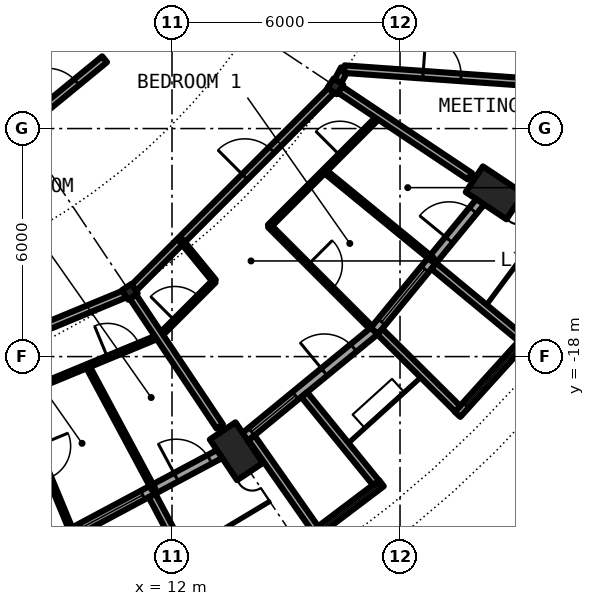
"""IFC4 building model, lengths in metres.
Left out: names, types, materials, properties, quantities, classifications, styles, units other than length and angle.
Written with IfcOpenShell. Run it as: python <this file> out.ifc"""

import sys

from ifc_helpers import new_model, si_unit, direction, frame, frame_2d, origin, origin_2d, place, context, subcontext, project, spatial, rectangle, circle, hollow_circle, i_section, extrude, element, fill, save


model = new_model("IFC4")
c1 = context("Model", 3, precision=1e-05, world=origin(), true_north=direction((0.0, 1.0)))
c2 = subcontext(c1, "Body", "Model", "MODEL_VIEW")
j1 = project(units=[si_unit("LENGTHUNIT", "METRE"), si_unit("PLANEANGLEUNIT", "RADIAN")], contexts=[c1])
p1 = place(None, origin())
s1 = spatial("IfcSite", under=j1, at=p1, CompositionType="ELEMENT")
p2 = place(p1, origin())
s2 = spatial("IfcBuilding", under=s1, at=p2, CompositionType="ELEMENT")
p3 = place(p2, frame((0.0, 0.0, 243.2)))
s3 = spatial("IfcBuildingStorey", under=s2, at=p3, CompositionType="ELEMENT", Elevation=243.2)
for number, where, z_axis, x_axis in (
    (1, (14.05, -21.027, 0.242), (-0.232, 0.347, 0.909), (-0.831, -0.556, 0.0)),
    (2, (21.027, -14.05, 0.242), (-0.347, 0.232, 0.909), (-0.556, -0.831, 0.0)),
):
    element("IfcColumn", number, at=place(p3, frame(where, z_axis=z_axis, x_axis=x_axis)), inside=s3, PredefinedType="COLUMN", context=c2, shape_type="SweptSolid", body=[
        extrude(hollow_circle(Radius=0.406, WallThickness=0.03, at=origin_2d()), origin(), (0.0, 0.0, 1.0), 3.09),
    ])
for number, where, z_axis, x_axis in (
    (3, (10.889, -16.297, 0.0), (0.0, 0.0, 1.0), (0.556, -0.831, 0.0)),
    (4, (16.297, -10.889, 0.0), (0.0, 0.0, 1.0), (0.831, -0.556, 0.0)),
):
    element("IfcColumn", number, at=place(p3, frame(where, z_axis=z_axis, x_axis=x_axis)), inside=s3, PredefinedType="COLUMN", context=c2, shape_type="SweptSolid", body=[
        extrude(i_section(OverallWidth=0.3, OverallDepth=0.3, WebThickness=0.011, FlangeThickness=0.019, FilletRadius=0.027, at=origin_2d()), origin(), (0.0, 0.0, 1.0), 3.05),
    ])
p4 = place(p3, frame((9.376, -22.635, 0.0), z_axis=(0.0, 0.0, 1.0), x_axis=(0.881903608701, 0.471429766731, 0.0)))
e5 = element("IfcWall", 5, at=p4, inside=s3, PredefinedType="SOLIDWALL", context=c2, shape_type="SweptSolid", body=[
    extrude(rectangle(XDim=4.802, YDim=0.25, at=frame_2d((2.401, 0.0))), origin(), (0.0, 0.0, 1.0), 2.7),
])
p5 = place(p4, frame((0.304, 0.0, 0.3)))
e6 = element("IfcOpeningElement", 6, at=p5, cuts=e5, PredefinedType="OPENING", context=c2, shape_type="SweptSolid", body=[
    extrude(rectangle(XDim=1.8, YDim=2.1, at=frame_2d((0.9, 1.05))), frame((0.0, 0.135, 0.0), z_axis=(0.0, -1.0, 0.0), x_axis=(1.0, 0.0, 0.0)), (0.0, 0.0, 1.0), 0.27),
])
p6 = place(p4, frame((3.099, 0.0, 0.0)))
e7 = element("IfcOpeningElement", 7, at=p6, cuts=e5, PredefinedType="OPENING", context=c2, shape_type="SweptSolid", body=[
    extrude(rectangle(XDim=1.0, YDim=2.2, at=frame_2d((0.5, 1.1))), frame((0.0, 0.135, 0.0), z_axis=(0.0, -1.0, 0.0), x_axis=(1.0, 0.0, 0.0)), (0.0, 0.0, 1.0), 0.27),
])
p7 = place(p3, frame((11.475, -21.655, -0.03), z_axis=(0.0, 0.0, 1.0), x_axis=(0.467917715158, -0.883772036128, 0.0)))
e8 = element("IfcWall", 8, at=p7, inside=s3, PredefinedType="SOLIDWALL", context=c2, shape_type="SweptSolid", body=[
    extrude(rectangle(XDim=2.992, YDim=0.2, at=frame_2d((1.496, 0.0))), origin(), (0.0, 0.0, 1.0), 2.73),
])
p8 = place(p3, frame((13.611, -20.371, 0.0), z_axis=(0.0, 0.0, 1.0), x_axis=(0.773007538262, 0.634396836208, 0.0)))
e9 = element("IfcWall", 9, at=p8, inside=s3, PredefinedType="SOLIDWALL", context=c2, shape_type="SweptSolid", body=[
    extrude(rectangle(XDim=4.803, YDim=0.25, at=frame_2d((2.402, 0.0))), origin(), (0.0, 0.0, 1.0), 2.7),
])
p9 = place(p8, frame((0.62, 0.0, 0.3)))
e10 = element("IfcOpeningElement", 10, at=p9, cuts=e9, PredefinedType="OPENING", context=c2, shape_type="SweptSolid", body=[
    extrude(rectangle(XDim=1.5, YDim=2.1, at=frame_2d((0.75, 1.05))), frame((0.0, 0.135, 0.0), z_axis=(0.0, -1.0, 0.0), x_axis=(1.0, 0.0, 0.0)), (0.0, 0.0, 1.0), 0.27),
])
p10 = place(p8, frame((3.099, 0.0, 0.0)))
e11 = element("IfcOpeningElement", 11, at=p10, cuts=e9, PredefinedType="OPENING", context=c2, shape_type="SweptSolid", body=[
    extrude(rectangle(XDim=1.0, YDim=2.2, at=frame_2d((0.5, 1.1))), frame((0.0, 0.135, 0.0), z_axis=(0.0, -1.0, 0.0), x_axis=(1.0, 0.0, 0.0)), (0.0, 0.0, 1.0), 0.27),
])
p11 = place(p3, frame((15.74, -22.672, -0.03), z_axis=(0.0, 0.0, 1.0), x_axis=(0.797805050803, 0.602915500641, 0.0)))
e12 = element("IfcWall", 12, at=p11, inside=s3, PredefinedType="SOLIDWALL", context=c2, shape_type="SweptSolid", body=[
    extrude(rectangle(XDim=2.221, YDim=0.2, at=frame_2d((1.11, 0.0))), origin(), (0.0, 0.0, 1.0), 2.73),
])
p12 = place(p11, frame((0.071, 0.0, 0.33)))
e13 = element("IfcOpeningElement", 13, at=p12, cuts=e12, PredefinedType="OPENING", context=c2, shape_type="SweptSolid", body=[
    extrude(circle(Radius=1.04, at=frame_2d((1.04, 1.04))), frame((0.0, 0.11, 0.0), z_axis=(0.0, -1.0, 0.0), x_axis=(1.0, 0.0, 0.0)), (0.0, 0.0, 1.0), 0.22),
])
p13 = place(p3, frame((14.093, -20.138, -0.03), z_axis=(0.0, 0.0, 1.0), x_axis=(0.573596998419, -0.81913764619, 0.0)))
e14 = element("IfcWall", 14, at=p13, inside=s3, PredefinedType="SOLIDWALL", context=c2, shape_type="SweptSolid", body=[
    extrude(rectangle(XDim=2.92, YDim=0.2, at=frame_2d((1.46, 0.0))), origin(), (0.0, 0.0, 1.0), 2.73),
])
p14 = place(p3, frame((15.479, -19.0, -0.03), z_axis=(0.0, 0.0, 1.0), x_axis=(0.631209771017, -0.775612161439, 0.0)))
e15 = element("IfcWall", 15, at=p14, inside=s3, PredefinedType="SOLIDWALL", context=c2, shape_type="SweptSolid", body=[
    extrude(rectangle(XDim=2.992, YDim=0.2, at=frame_2d((1.496, 0.0))), origin(), (0.0, 0.0, 1.0), 2.73),
])
p15 = place(p3, frame((17.324, -17.324, 0.0), z_axis=(0.0, 0.0, 1.0), x_axis=(0.634396836208, 0.773007538262, 0.0)))
e16 = element("IfcWall", 16, at=p15, inside=s3, PredefinedType="SOLIDWALL", context=c2, shape_type="SweptSolid", body=[
    extrude(rectangle(XDim=4.803, YDim=0.25, at=frame_2d((2.402, 0.0))), origin(), (0.0, 0.0, 1.0), 2.7),
])
p16 = place(p15, frame((0.304, 0.0, 0.3)))
e17 = element("IfcOpeningElement", 17, at=p16, cuts=e16, PredefinedType="OPENING", context=c2, shape_type="SweptSolid", body=[
    extrude(rectangle(XDim=1.8, YDim=2.1, at=frame_2d((0.9, 1.05))), frame((0.0, 0.135, 0.0), z_axis=(0.0, -1.0, 0.0), x_axis=(1.0, 0.0, 0.0)), (0.0, 0.0, 1.0), 0.27),
])
p17 = place(p15, frame((3.099, 0.0, 0.0)))
e18 = element("IfcOpeningElement", 18, at=p17, cuts=e16, PredefinedType="OPENING", context=c2, shape_type="SweptSolid", body=[
    extrude(rectangle(XDim=1.0, YDim=2.2, at=frame_2d((0.5, 1.1))), frame((0.0, 0.135, 0.0), z_axis=(0.0, -1.0, 0.0), x_axis=(1.0, 0.0, 0.0)), (0.0, 0.0, 1.0), 0.27),
])
p18 = place(p3, frame((19.513, -19.52, -0.03), z_axis=(0.0, 0.0, 1.0), x_axis=(0.671487056022, 0.741016284298, 0.0)))
e19 = element("IfcWall", 19, at=p18, inside=s3, PredefinedType="SOLIDWALL", context=c2, shape_type="SweptSolid", body=[
    extrude(rectangle(XDim=2.718, YDim=0.2, at=frame_2d((1.359, 0.0))), origin(), (0.0, 0.0, 1.0), 2.73),
])
p19 = place(p18, frame((0.319, 0.0, 0.33)))
e20 = element("IfcOpeningElement", 20, at=p19, cuts=e19, PredefinedType="OPENING", context=c2, shape_type="SweptSolid", body=[
    extrude(circle(Radius=1.04, at=frame_2d((1.04, 1.04))), frame((0.0, 0.11, 0.0), z_axis=(0.0, -1.0, 0.0), x_axis=(1.0, 0.0, 0.0)), (0.0, 0.0, 1.0), 0.22),
])
p20 = place(p3, frame((17.47, -17.344, -0.03), z_axis=(0.0, 0.0, 1.0), x_axis=(0.709896457854, -0.704306055012, 0.0)))
e21 = element("IfcWall", 21, at=p20, inside=s3, PredefinedType="SOLIDWALL", context=c2, shape_type="SweptSolid", body=[
    extrude(rectangle(XDim=2.882, YDim=0.2, at=frame_2d((1.441, 0.0))), origin(), (0.0, 0.0, 1.0), 2.73),
])
p21 = place(p3, frame((18.888, -15.615, -0.03), z_axis=(0.0, 0.0, 1.0), x_axis=(0.770489638069, -0.637452521862, 0.0)))
e22 = element("IfcWall", 22, at=p21, inside=s3, PredefinedType="SOLIDWALL", context=c2, shape_type="SweptSolid", body=[
    extrude(rectangle(XDim=2.993, YDim=0.2, at=frame_2d((1.497, 0.0))), origin(), (0.0, 0.0, 1.0), 2.73),
])
p22 = place(p3, frame((7.874, -19.033, 0.0), z_axis=(0.0, 0.0, 1.0), x_axis=(0.924018283069, 0.382348286976, 0.0)))
e23 = element("IfcWall", 23, at=p22, inside=s3, PredefinedType="PARTITIONING", context=c2, shape_type="SweptSolid", body=[
    extrude(rectangle(XDim=4.101, YDim=0.1, at=frame_2d((2.05, 0.0))), origin(), (0.0, 0.0, 1.0), 2.7),
])
p23 = place(p22, frame((2.632, 0.0, 0.0)))
e24 = element("IfcOpeningElement", 24, at=p23, cuts=e23, PredefinedType="OPENING", context=c2, shape_type="SweptSolid", body=[
    extrude(rectangle(XDim=0.9, YDim=2.3, at=frame_2d((0.45, 1.15))), frame((0.0, 0.06, 0.0), z_axis=(0.0, -1.0, 0.0), x_axis=(1.0, 0.0, 0.0)), (0.0, 0.0, 1.0), 0.12),
])
p24 = place(p3, frame((11.662, -17.466, 0.0), z_axis=(0.0, 0.0, 1.0), x_axis=(0.707106781187, 0.707106781187, 0.0)))
e25 = element("IfcWall", 25, at=p24, inside=s3, PredefinedType="PARTITIONING", context=c2, shape_type="SweptSolid", body=[
    extrude(rectangle(XDim=2.048, YDim=0.1, at=frame_2d((1.024, 0.0))), origin(), (0.0, 0.0, 1.0), 2.7),
])
p25 = place(p24, frame((0.581, 0.0, 0.0)))
e26 = element("IfcOpeningElement", 26, at=p25, cuts=e25, PredefinedType="OPENING", context=c2, shape_type="SweptSolid", body=[
    extrude(rectangle(XDim=0.9, YDim=2.3, at=frame_2d((0.45, 1.15))), frame((0.0, 0.06, 0.0), z_axis=(0.0, -1.0, 0.0), x_axis=(1.0, 0.0, 0.0)), (0.0, 0.0, 1.0), 0.12),
])
p26 = place(p3, frame((14.559, -14.569, 0.0), z_axis=(0.0, 0.0, 1.0), x_axis=(0.707106781187, 0.707106781187, 0.0)))
e27 = element("IfcWall", 27, at=p26, inside=s3, PredefinedType="PARTITIONING", context=c2, shape_type="SweptSolid", body=[
    extrude(rectangle(XDim=4.111, YDim=0.1, at=frame_2d((2.056, 0.0))), origin(), (0.0, 0.0, 1.0), 2.7),
])
p27 = place(p26, frame((2.633, 0.0, 0.0)))
e28 = element("IfcOpeningElement", 28, at=p27, cuts=e27, PredefinedType="OPENING", context=c2, shape_type="SweptSolid", body=[
    extrude(rectangle(XDim=0.9, YDim=2.3, at=frame_2d((0.45, 1.15))), frame((0.0, 0.06, 0.0), z_axis=(0.0, -1.0, 0.0), x_axis=(1.0, 0.0, 0.0)), (0.0, 0.0, 1.0), 0.12),
])
p28 = place(p3, frame((16.367, -10.756, 0.0), z_axis=(0.0, 0.0, 1.0), x_axis=(0.465802239822, 0.884888848035, 0.0)))
e29 = element("IfcWall", 29, at=p28, inside=s3, PredefinedType="PARTITIONING", context=c2, shape_type="SweptSolid", body=[
    extrude(rectangle(XDim=0.361, YDim=0.2, at=frame_2d((0.18, 0.0))), origin(), (0.0, 0.0, 1.0), 2.7),
])
p29 = place(p3, frame((3.965, -19.165, 0.0), z_axis=(0.0, 0.0, 1.0), x_axis=(0.923857139404, 0.382737489635, 0.0)))
e30 = element("IfcWall", 30, at=p29, inside=s3, PredefinedType="PARTITIONING", context=c2, shape_type="SweptSolid", body=[
    extrude(rectangle(XDim=7.342, YDim=0.2, at=frame_2d((3.671, 0.0))), origin(), (0.0, 0.0, 1.0), 2.45),
])
p30 = place(p29, frame((4.126, 0.0, 0.0)))
e31 = element("IfcOpeningElement", 31, at=p30, cuts=e30, PredefinedType="OPENING", context=c2, shape_type="SweptSolid", body=[
    extrude(rectangle(XDim=1.0, YDim=2.3, at=frame_2d((0.5, 1.15))), frame((0.0, 0.11, 0.0), z_axis=(0.0, -1.0, 0.0), x_axis=(1.0, 0.0, 0.0)), (0.0, 0.0, 1.0), 0.22),
])
p31 = place(p3, frame((10.997, -16.189, 0.0), z_axis=(0.0, 0.0, 1.0), x_axis=(0.707106781187, 0.707106781187, 0.0)))
e32 = element("IfcWall", 32, at=p31, inside=s3, PredefinedType="PARTITIONING", context=c2, shape_type="SweptSolid", body=[
    extrude(rectangle(XDim=7.343, YDim=0.2, at=frame_2d((3.671, 0.0))), origin(), (0.0, 0.0, 1.0), 2.45),
])
p32 = place(p31, frame((4.127, 0.0, 0.0)))
e33 = element("IfcOpeningElement", 33, at=p32, cuts=e32, PredefinedType="OPENING", context=c2, shape_type="SweptSolid", body=[
    extrude(rectangle(XDim=1.0, YDim=2.3, at=frame_2d((0.5, 1.15))), frame((0.0, 0.11, 0.0), z_axis=(0.0, -1.0, 0.0), x_axis=(1.0, 0.0, 0.0)), (0.0, 0.0, 1.0), 0.22),
])
p33 = place(p3, frame((5.74, -13.858, 0.0), z_axis=(0.0, 0.0, 1.0), x_axis=(0.773071783484, 0.634318545828, 0.0)))
e34 = element("IfcWall", 34, at=p33, inside=s3, PredefinedType="PARTITIONING", context=c2, shape_type="SweptSolid", body=[
    extrude(rectangle(XDim=5.803, YDim=0.2, at=frame_2d((2.901, 0.0))), origin(), (0.0, 0.0, 1.0), 2.7),
])
p34 = place(p33, frame((3.854, 0.0, 0.0)))
e35 = element("IfcOpeningElement", 35, at=p34, cuts=e34, PredefinedType="OPENING", context=c2, shape_type="SweptSolid", body=[
    extrude(rectangle(XDim=1.0, YDim=2.3, at=frame_2d((0.5, 1.15))), frame((0.0, 0.11, 0.0), z_axis=(0.0, -1.0, 0.0), x_axis=(1.0, 0.0, 0.0)), (0.0, 0.0, 1.0), 0.22),
])
p35 = place(p3, frame((16.535, -10.437, 0.0), z_axis=(0.0, 0.0, 1.0), x_axis=(0.997515141784, -0.070452408845, 0.0)))
e36 = element("IfcWall", 36, at=p35, inside=s3, PredefinedType="PARTITIONING", context=c2, shape_type="SweptSolid", body=[
    extrude(rectangle(XDim=5.153, YDim=0.2, at=frame_2d((2.576, 0.0))), origin(), (0.0, 0.0, 1.0), 2.7),
])
p36 = place(p35, frame((2.076, 0.0, 0.0)))
e37 = element("IfcOpeningElement", 37, at=p36, cuts=e36, PredefinedType="OPENING", context=c2, shape_type="SweptSolid", body=[
    extrude(rectangle(XDim=1.0, YDim=2.3, at=frame_2d((0.5, 1.15))), frame((0.0, 0.11, 0.0), z_axis=(0.0, -1.0, 0.0), x_axis=(1.0, 0.0, 0.0)), (0.0, 0.0, 1.0), 0.22),
])
p37 = place(p3, frame((7.882, -19.029, 0.0), z_axis=(0.0, 0.0, 1.0), x_axis=(0.382637120452, -0.923898714174, 0.0)))
e38 = element("IfcWall", 38, at=p37, inside=s3, PredefinedType="PARTITIONING", context=c2, shape_type="SweptSolid", body=[
    extrude(rectangle(XDim=3.779, YDim=0.1, at=frame_2d((1.889, 0.0))), origin(), (0.0, 0.0, 1.0), 2.7),
])
p38 = place(p37, frame((1.439, 0.0, 0.0)))
e39 = element("IfcOpeningElement", 39, at=p38, cuts=e38, PredefinedType="OPENING", context=c2, shape_type="SweptSolid", body=[
    extrude(rectangle(XDim=0.9, YDim=2.3, at=frame_2d((0.45, 1.15))), frame((0.0, 0.06, 0.0), z_axis=(0.0, -1.0, 0.0), x_axis=(1.0, 0.0, 0.0)), (0.0, 0.0, 1.0), 0.12),
])
p39 = place(p3, frame((9.774, -18.245, 0.0), z_axis=(0.0, 0.0, 1.0), x_axis=(0.47239643711, -0.881386184488, 0.0)))
e40 = element("IfcWall", 40, at=p39, inside=s3, PredefinedType="PARTITIONING", context=c2, shape_type="SweptSolid", body=[
    extrude(rectangle(XDim=3.677, YDim=0.1, at=frame_2d((1.839, 0.0))), origin(), (0.0, 0.0, 1.0), 2.7),
])
p40 = place(p3, frame((10.972, -16.422, 0.0), z_axis=(0.0, 0.0, 1.0), x_axis=(0.555878781566, -0.831263363926, 0.0)))
e41 = element("IfcWall", 41, at=p40, inside=s3, PredefinedType="PARTITIONING", context=c2, shape_type="SweptSolid", body=[
    extrude(rectangle(XDim=4.109, YDim=0.2, at=frame_2d((2.055, 0.0))), origin(), (0.0, 0.0, 1.0), 2.7),
])
p41 = place(p3, frame((12.241, -14.945, 0.0), z_axis=(0.0, 0.0, 1.0), x_axis=(0.633719643525, -0.773562805085, 0.0)))
e42 = element("IfcWall", 42, at=p41, inside=s3, PredefinedType="PARTITIONING", context=c2, shape_type="SweptSolid", body=[
    extrude(rectangle(XDim=1.379, YDim=0.1, at=frame_2d((0.689, 0.0))), origin(), (0.0, 0.0, 1.0), 2.7),
])
p42 = place(p3, frame((14.564, -14.564, 0.0), z_axis=(0.0, 0.0, 1.0), x_axis=(0.707106781187, -0.707106781187, 0.0)))
e43 = element("IfcWall", 43, at=p42, inside=s3, PredefinedType="PARTITIONING", context=c2, shape_type="SweptSolid", body=[
    extrude(rectangle(XDim=3.779, YDim=0.1, at=frame_2d((1.89, 0.0))), origin(), (0.0, 0.0, 1.0), 2.7),
])
p43 = place(p42, frame((1.439, 0.0, 0.0)))
e44 = element("IfcOpeningElement", 44, at=p43, cuts=e43, PredefinedType="OPENING", context=c2, shape_type="SweptSolid", body=[
    extrude(rectangle(XDim=0.9, YDim=2.3, at=frame_2d((0.45, 1.15))), frame((0.0, 0.06, 0.0), z_axis=(0.0, -1.0, 0.0), x_axis=(1.0, 0.0, 0.0)), (0.0, 0.0, 1.0), 0.12),
])
p44 = place(p3, frame((16.012, -13.115, 0.0), z_axis=(0.0, 0.0, 1.0), x_axis=(0.773640700514, -0.633624546958, 0.0)))
e45 = element("IfcWall", 45, at=p44, inside=s3, PredefinedType="PARTITIONING", context=c2, shape_type="SweptSolid", body=[
    extrude(rectangle(XDim=3.677, YDim=0.1, at=frame_2d((1.839, 0.0))), origin(), (0.0, 0.0, 1.0), 2.7),
])
p45 = place(p3, frame((16.422, -10.972, 0.0), z_axis=(0.0, 0.0, 1.0), x_axis=(0.831400632185, -0.55567345519, 0.0)))
e46 = element("IfcWall", 46, at=p45, inside=s3, PredefinedType="PARTITIONING", context=c2, shape_type="SweptSolid", body=[
    extrude(rectangle(XDim=4.108, YDim=0.2, at=frame_2d((2.054, 0.0))), origin(), (0.0, 0.0, 1.0), 2.7),
])
p46 = place(p5, origin())
e47 = element("IfcWindow", 47, at=p46, inside=s3, PartitioningType="SINGLE_PANEL", PredefinedType="WINDOW", context=c2, shape_type="SweptSolid", body=[
    extrude(rectangle(XDim=1.8, YDim=2.1, at=frame_2d((0.9, 1.05))), frame((0.0, 0.03, 0.0), z_axis=(0.0, -1.0, 0.0), x_axis=(1.0, 0.0, 0.0)), (0.0, 0.0, 1.0), 0.06),
])
fill(e6, e47)
p47 = place(p6, origin())
e48 = element("IfcDoor", 48, at=p47, inside=s3, OperationType="SINGLE_SWING_LEFT", PredefinedType="DOOR", context=c2, shape_type="SweptSolid", body=[
    extrude(rectangle(XDim=1.0, YDim=2.2, at=frame_2d((0.5, 1.1))), frame((0.0, 0.025, 0.0), z_axis=(0.0, -1.0, 0.0), x_axis=(1.0, 0.0, 0.0)), (0.0, 0.0, 1.0), 0.05),
])
fill(e7, e48)
p48 = place(p9, origin())
e49 = element("IfcWindow", 49, at=p48, inside=s3, PartitioningType="SINGLE_PANEL", PredefinedType="WINDOW", context=c2, shape_type="SweptSolid", body=[
    extrude(rectangle(XDim=1.5, YDim=2.1, at=frame_2d((0.75, 1.05))), frame((0.0, 0.03, 0.0), z_axis=(0.0, -1.0, 0.0), x_axis=(1.0, 0.0, 0.0)), (0.0, 0.0, 1.0), 0.06),
])
fill(e10, e49)
p49 = place(p12, origin())
e50 = element("IfcWindow", 50, at=p49, inside=s3, PartitioningType="SINGLE_PANEL", PredefinedType="WINDOW", context=c2, shape_type="SweptSolid", body=[
    extrude(circle(Radius=1.04, at=frame_2d((1.04, 1.04))), frame((0.0, 0.03, 0.0), z_axis=(0.0, -1.0, 0.0), x_axis=(1.0, 0.0, 0.0)), (0.0, 0.0, 1.0), 0.06),
])
fill(e13, e50)
p50 = place(p10, origin())
e51 = element("IfcDoor", 51, at=p50, inside=s3, OperationType="SINGLE_SWING_LEFT", PredefinedType="DOOR", context=c2, shape_type="SweptSolid", body=[
    extrude(rectangle(XDim=1.0, YDim=2.2, at=frame_2d((0.5, 1.1))), frame((0.0, 0.025, 0.0), z_axis=(0.0, -1.0, 0.0), x_axis=(1.0, 0.0, 0.0)), (0.0, 0.0, 1.0), 0.05),
])
fill(e11, e51)
p51 = place(p16, origin())
e52 = element("IfcWindow", 52, at=p51, inside=s3, PartitioningType="SINGLE_PANEL", PredefinedType="WINDOW", context=c2, shape_type="SweptSolid", body=[
    extrude(rectangle(XDim=1.8, YDim=2.1, at=frame_2d((0.9, 1.05))), frame((0.0, 0.03, 0.0), z_axis=(0.0, -1.0, 0.0), x_axis=(1.0, 0.0, 0.0)), (0.0, 0.0, 1.0), 0.06),
])
fill(e17, e52)
p52 = place(p19, origin())
e53 = element("IfcWindow", 53, at=p52, inside=s3, PartitioningType="SINGLE_PANEL", PredefinedType="WINDOW", context=c2, shape_type="SweptSolid", body=[
    extrude(circle(Radius=1.04, at=frame_2d((1.04, 1.04))), frame((0.0, 0.03, 0.0), z_axis=(0.0, -1.0, 0.0), x_axis=(1.0, 0.0, 0.0)), (0.0, 0.0, 1.0), 0.06),
])
fill(e20, e53)
p53 = place(p17, origin())
e54 = element("IfcDoor", 54, at=p53, inside=s3, OperationType="SINGLE_SWING_LEFT", PredefinedType="DOOR", context=c2, shape_type="SweptSolid", body=[
    extrude(rectangle(XDim=1.0, YDim=2.2, at=frame_2d((0.5, 1.1))), frame((0.0, 0.025, 0.0), z_axis=(0.0, -1.0, 0.0), x_axis=(1.0, 0.0, 0.0)), (0.0, 0.0, 1.0), 0.05),
])
fill(e18, e54)
p54 = place(p23, origin())
e55 = element("IfcDoor", 55, at=p54, inside=s3, OperationType="SINGLE_SWING_RIGHT", PredefinedType="DOOR", context=c2, shape_type="SweptSolid", body=[
    extrude(rectangle(XDim=0.9, YDim=2.3, at=frame_2d((0.45, 1.15))), frame((0.0, 0.025, 0.0), z_axis=(0.0, -1.0, 0.0), x_axis=(1.0, 0.0, 0.0)), (0.0, 0.0, 1.0), 0.05),
])
fill(e24, e55)
p55 = place(p32, origin())
e56 = element("IfcDoor", 56, at=p55, inside=s3, OperationType="SINGLE_SWING_RIGHT", PredefinedType="DOOR", context=c2, shape_type="SweptSolid", body=[
    extrude(rectangle(XDim=1.0, YDim=2.3, at=frame_2d((0.5, 1.15))), frame((0.0, 0.025, 0.0), z_axis=(0.0, -1.0, 0.0), x_axis=(1.0, 0.0, 0.0)), (0.0, 0.0, 1.0), 0.05),
])
fill(e33, e56)
p56 = place(p25, origin())
e57 = element("IfcDoor", 57, at=p56, inside=s3, OperationType="SINGLE_SWING_RIGHT", PredefinedType="DOOR", context=c2, shape_type="SweptSolid", body=[
    extrude(rectangle(XDim=0.9, YDim=2.3, at=frame_2d((0.45, 1.15))), frame((0.0, 0.025, 0.0), z_axis=(0.0, -1.0, 0.0), x_axis=(1.0, 0.0, 0.0)), (0.0, 0.0, 1.0), 0.05),
])
fill(e26, e57)
p57 = place(p43, origin())
e58 = element("IfcDoor", 58, at=p57, inside=s3, OperationType="SINGLE_SWING_LEFT", PredefinedType="DOOR", context=c2, shape_type="SweptSolid", body=[
    extrude(rectangle(XDim=0.9, YDim=2.3, at=frame_2d((0.45, 1.15))), frame((0.0, 0.025, 0.0), z_axis=(0.0, -1.0, 0.0), x_axis=(1.0, 0.0, 0.0)), (0.0, 0.0, 1.0), 0.05),
])
fill(e44, e58)
p58 = place(p27, origin())
e59 = element("IfcDoor", 59, at=p58, inside=s3, OperationType="SINGLE_SWING_RIGHT", PredefinedType="DOOR", context=c2, shape_type="SweptSolid", body=[
    extrude(rectangle(XDim=0.9, YDim=2.3, at=frame_2d((0.45, 1.15))), frame((0.0, 0.025, 0.0), z_axis=(0.0, -1.0, 0.0), x_axis=(1.0, 0.0, 0.0)), (0.0, 0.0, 1.0), 0.05),
])
fill(e28, e59)
p59 = place(p34, origin())
e60 = element("IfcDoor", 60, at=p59, inside=s3, OperationType="SINGLE_SWING_RIGHT", PredefinedType="DOOR", context=c2, shape_type="SweptSolid", body=[
    extrude(rectangle(XDim=1.0, YDim=2.3, at=frame_2d((0.5, 1.15))), frame((0.0, 0.025, 0.0), z_axis=(0.0, -1.0, 0.0), x_axis=(1.0, 0.0, 0.0)), (0.0, 0.0, 1.0), 0.05),
])
fill(e35, e60)
p60 = place(p36, origin())
e61 = element("IfcDoor", 61, at=p60, inside=s3, OperationType="SINGLE_SWING_LEFT", PredefinedType="DOOR", context=c2, shape_type="SweptSolid", body=[
    extrude(rectangle(XDim=1.0, YDim=2.3, at=frame_2d((0.5, 1.15))), frame((0.0, 0.025, 0.0), z_axis=(0.0, -1.0, 0.0), x_axis=(1.0, 0.0, 0.0)), (0.0, 0.0, 1.0), 0.05),
])
fill(e37, e61)
save(model, sys.argv[1])
